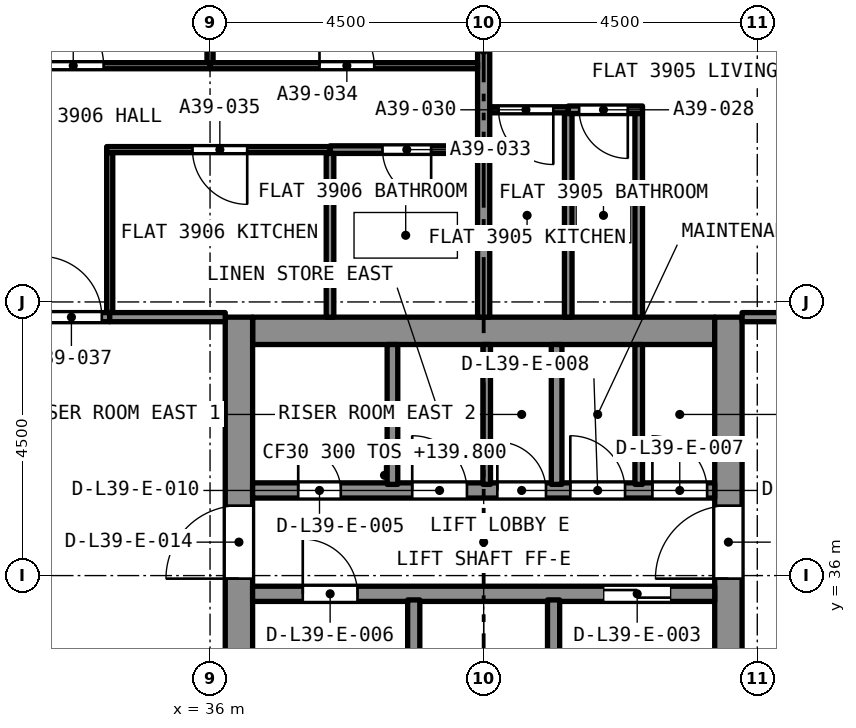
"""IFC4 building model, lengths in metres.
Left out: names, types, materials, properties, quantities, classifications, styles, units other than length and angle.
Written with IfcOpenShell. Run it as: python <this file> out.ifc"""

import sys

from ifc_helpers import new_model, si_unit, direction, frame, frame_2d, origin, place, context, subcontext, project, spatial, rectangle, extrude, element, fill, save


model = new_model("IFC4")
c1 = context("Model", 3, precision=1e-05, world=origin(), true_north=direction((0.0, 1.0)))
c2 = subcontext(c1, "Body", "Model", "MODEL_VIEW")
j1 = project(units=[si_unit("LENGTHUNIT", "METRE"), si_unit("PLANEANGLEUNIT", "RADIAN")], contexts=[c1])
p1 = place(None, origin())
s1 = spatial("IfcSite", under=j1, at=p1, CompositionType="ELEMENT")
p2 = place(p1, origin())
s2 = spatial("IfcBuilding", under=s1, at=p2, CompositionType="ELEMENT")
p3 = place(p2, frame((0.0, 0.0, 139.8)))
s3 = spatial("IfcBuildingStorey", under=s2, at=p3, CompositionType="ELEMENT", Elevation=139.8)
p4 = place(p3, frame((36.7, 40.025, 0.0), z_axis=(0.0, 0.0, 1.0), x_axis=(1.0, 0.0, 0.0)))
e1 = element("IfcWall", 1, at=p4, inside=s3, PredefinedType="SOLIDWALL", context=c2, shape_type="SweptSolid", body=[
    extrude(rectangle(XDim=7.6, YDim=0.45, at=frame_2d((3.8, 0.0))), origin(), (0.0, 0.0, 1.0), 3.2),
])
p5 = place(p3, frame((36.475, 27.25, 0.0), z_axis=(0.0, 0.0, 1.0), x_axis=(0.0, 1.0, 0.0)))
e2 = element("IfcWall", 2, at=p5, inside=s3, PredefinedType="SOLIDWALL", context=c2, shape_type="SweptSolid", body=[
    extrude(rectangle(XDim=13.0, YDim=0.45, at=frame_2d((6.5, 0.0))), origin(), (0.0, 0.0, 1.0), 3.2),
])
p6 = place(p5, frame((8.7, 0.0, 0.0)))
e3 = element("IfcOpeningElement", 3, at=p6, cuts=e2, PredefinedType="OPENING", context=c2, shape_type="SweptSolid", body=[
    extrude(rectangle(XDim=1.2, YDim=2.1, at=frame_2d((0.6, 1.05))), frame((0.0, 0.235, 0.0), z_axis=(0.0, -1.0, 0.0), x_axis=(1.0, 0.0, 0.0)), (0.0, 0.0, 1.0), 0.47),
])
p7 = place(p3, frame((44.525, 27.25, 0.0), z_axis=(0.0, 0.0, 1.0), x_axis=(0.0, 1.0, 0.0)))
e4 = element("IfcWall", 4, at=p7, inside=s3, PredefinedType="SOLIDWALL", context=c2, shape_type="SweptSolid", body=[
    extrude(rectangle(XDim=13.0, YDim=0.45, at=frame_2d((6.5, 0.0))), origin(), (0.0, 0.0, 1.0), 3.2),
])
p8 = place(p7, frame((8.7, 0.0, 0.0)))
e5 = element("IfcOpeningElement", 5, at=p8, cuts=e4, PredefinedType="OPENING", context=c2, shape_type="SweptSolid", body=[
    extrude(rectangle(XDim=1.2, YDim=2.1, at=frame_2d((0.6, 1.05))), frame((0.0, 0.235, 0.0), z_axis=(0.0, -1.0, 0.0), x_axis=(1.0, 0.0, 0.0)), (0.0, 0.0, 1.0), 0.47),
])
p9 = place(p3, frame((43.113, 43.66, 0.0), z_axis=(0.0, 0.0, 1.0), x_axis=(-1.0, 0.0, 0.0)))
e6 = element("IfcWall", 6, at=p9, inside=s3, PredefinedType="PARTITIONING", context=c2, shape_type="SweptSolid", body=[
    extrude(rectangle(XDim=1.222, YDim=0.125, at=frame_2d((0.611, 0.0))), origin(), (0.0, 0.0, 1.0), 2.9),
])
p10 = place(p9, frame((0.242, 0.0, 0.0)))
e7 = element("IfcOpeningElement", 7, at=p10, cuts=e6, PredefinedType="OPENING", context=c2, shape_type="SweptSolid", body=[
    extrude(rectangle(XDim=0.8, YDim=2.1, at=frame_2d((0.4, 1.05))), frame((0.0, 0.073, 0.0), z_axis=(0.0, -1.0, 0.0), x_axis=(1.0, 0.0, 0.0)), (0.0, 0.0, 1.0), 0.145),
])
for number, where, z_axis, x_axis in (
    (8, (43.05, 40.25, 0.0), (0.0, 0.0, 1.0), (0.0, 1.0, 0.0)),
    (9, (41.891, 40.25, 0.0), (0.0, 0.0, 1.0), (0.0, 1.0, 0.0)),
):
    element("IfcWall", number, at=place(p3, frame(where, z_axis=z_axis, x_axis=x_axis)), inside=s3, PredefinedType="PARTITIONING", context=c2, shape_type="SweptSolid", body=[
        extrude(rectangle(XDim=3.347, YDim=0.125, at=frame_2d((1.674, 0.0))), origin(), (0.0, 0.0, 1.0), 2.9),
    ])
p11 = place(p3, frame((41.891, 43.66, 0.0), z_axis=(0.0, 0.0, 1.0), x_axis=(-1.0, 0.0, 0.0)))
e10 = element("IfcWall", 10, at=p11, inside=s3, PredefinedType="PARTITIONING", context=c2, shape_type="SweptSolid", body=[
    extrude(rectangle(XDim=1.291, YDim=0.1, at=frame_2d((0.646, 0.0))), origin(), (0.0, 0.0, 1.0), 2.9),
])
p12 = place(p11, frame((0.246, 0.0, 0.0)))
e11 = element("IfcOpeningElement", 11, at=p12, cuts=e10, PredefinedType="OPENING", context=c2, shape_type="SweptSolid", body=[
    extrude(rectangle(XDim=0.9, YDim=2.1, at=frame_2d((0.45, 1.05))), frame((0.0, 0.06, 0.0), z_axis=(0.0, -1.0, 0.0), x_axis=(1.0, 0.0, 0.0)), (0.0, 0.0, 1.0), 0.12),
])
p13 = place(p3, frame((44.75, 40.25, 0.0), z_axis=(0.0, 0.0, 1.0), x_axis=(1.0, 0.0, 0.0)))
e12 = element("IfcWall", 12, at=p13, inside=s3, PredefinedType="PARTITIONING", context=c2, shape_type="SweptSolid", body=[
    extrude(rectangle(XDim=4.275, YDim=0.15, at=frame_2d((2.137, 0.0))), origin(), (0.0, 0.0, 1.0), 2.9),
])
p14 = place(p13, frame((2.0, 0.0, 0.0)))
e13 = element("IfcOpeningElement", 13, at=p14, cuts=e12, PredefinedType="OPENING", context=c2, shape_type="SweptSolid", body=[
    extrude(rectangle(XDim=1.0, YDim=2.1, at=frame_2d((0.5, 1.05))), frame((0.0, 0.085, 0.0), z_axis=(0.0, -1.0, 0.0), x_axis=(1.0, 0.0, 0.0)), (0.0, 0.0, 1.0), 0.17),
])
p15 = place(p3, frame((40.5, 40.25, 0.0), z_axis=(0.0, 0.0, 1.0), x_axis=(0.0, 1.0, 0.0)))
e14 = element("IfcWall", 14, at=p15, inside=s3, PredefinedType="PARTITIONING", context=c2, shape_type="SweptSolid", body=[
    extrude(rectangle(XDim=8.775, YDim=0.2, at=frame_2d((4.387, 0.0))), origin(), (0.0, 0.0, 1.0), 2.9),
])
p16 = place(p3, frame((40.4, 43.005, 0.0), z_axis=(0.0, 0.0, 1.0), x_axis=(-1.0, 0.0, 0.0)))
e15 = element("IfcWall", 15, at=p16, inside=s3, PredefinedType="PARTITIONING", context=c2, shape_type="SweptSolid", body=[
    extrude(rectangle(XDim=2.427, YDim=0.125, at=frame_2d((1.214, 0.0))), origin(), (0.0, 0.0, 1.0), 2.9),
])
p17 = place(p16, frame((0.764, 0.0, 0.0)))
e16 = element("IfcOpeningElement", 16, at=p17, cuts=e15, PredefinedType="OPENING", context=c2, shape_type="SweptSolid", body=[
    extrude(rectangle(XDim=0.8, YDim=2.1, at=frame_2d((0.4, 1.05))), frame((0.0, 0.073, 0.0), z_axis=(0.0, -1.0, 0.0), x_axis=(1.0, 0.0, 0.0)), (0.0, 0.0, 1.0), 0.145),
])
p18 = place(p3, frame((37.973, 40.25, 0.0), z_axis=(0.0, 0.0, 1.0), x_axis=(0.0, 1.0, 0.0)))
e17 = element("IfcWall", 17, at=p18, inside=s3, PredefinedType="PARTITIONING", context=c2, shape_type="SweptSolid", body=[
    extrude(rectangle(XDim=2.692, YDim=0.125, at=frame_2d((1.346, 0.0))), origin(), (0.0, 0.0, 1.0), 2.9),
])
p19 = place(p3, frame((36.0, 44.385, 0.0), z_axis=(0.0, 0.0, 1.0), x_axis=(1.0, 0.0, 0.0)))
e18 = element("IfcWall", 18, at=p19, inside=s3, PredefinedType="PARTITIONING", context=c2, shape_type="SweptSolid", body=[
    extrude(rectangle(XDim=4.4, YDim=0.1, at=frame_2d((2.2, 0.0))), origin(), (0.0, 0.0, 1.0), 2.9),
])
p20 = place(p19, frame((1.8, 0.0, 0.0)))
e19 = element("IfcOpeningElement", 19, at=p20, cuts=e18, PredefinedType="OPENING", context=c2, shape_type="SweptSolid", body=[
    extrude(rectangle(XDim=0.9, YDim=2.1, at=frame_2d((0.45, 1.05))), frame((0.0, 0.06, 0.0), z_axis=(0.0, -1.0, 0.0), x_axis=(1.0, 0.0, 0.0)), (0.0, 0.0, 1.0), 0.12),
])
p21 = place(p3, frame((36.0, 44.435, 0.0), z_axis=(0.0, 0.0, 1.0), x_axis=(0.0, 1.0, 0.0)))
e20 = element("IfcWall", 20, at=p21, inside=s3, PredefinedType="PARTITIONING", context=c2, shape_type="SweptSolid", body=[
    extrude(rectangle(XDim=4.59, YDim=0.1, at=frame_2d((2.295, 0.0))), origin(), (0.0, 0.0, 1.0), 2.9),
])
p22 = place(p3, frame((37.973, 43.005, 0.0), z_axis=(0.0, 0.0, 1.0), x_axis=(-1.0, 0.0, 0.0)))
e21 = element("IfcWall", 21, at=p22, inside=s3, PredefinedType="PARTITIONING", context=c2, shape_type="SweptSolid", body=[
    extrude(rectangle(XDim=3.673, YDim=0.1, at=frame_2d((1.836, 0.0))), origin(), (0.0, 0.0, 1.0), 2.9),
])
p23 = place(p22, frame((1.361, 0.0, 0.0)))
e22 = element("IfcOpeningElement", 22, at=p23, cuts=e21, PredefinedType="OPENING", context=c2, shape_type="SweptSolid", body=[
    extrude(rectangle(XDim=0.9, YDim=2.1, at=frame_2d((0.45, 1.05))), frame((0.0, 0.06, 0.0), z_axis=(0.0, -1.0, 0.0), x_axis=(1.0, 0.0, 0.0)), (0.0, 0.0, 1.0), 0.12),
])
p24 = place(p3, frame((34.35, 40.325, 0.0), z_axis=(0.0, 0.0, 1.0), x_axis=(0.0, 1.0, 0.0)))
e23 = element("IfcWall", 23, at=p24, inside=s3, PredefinedType="PARTITIONING", context=c2, shape_type="SweptSolid", body=[
    extrude(rectangle(XDim=2.63, YDim=0.1, at=frame_2d((1.315, 0.0))), origin(), (0.0, 0.0, 1.0), 2.9),
])
p25 = place(p3, frame((31.625, 44.385, 0.0), z_axis=(0.0, 0.0, 1.0), x_axis=(1.0, 0.0, 0.0)))
e24 = element("IfcWall", 24, at=p25, inside=s3, PredefinedType="PARTITIONING", context=c2, shape_type="SweptSolid", body=[
    extrude(rectangle(XDim=4.375, YDim=0.1, at=frame_2d((2.188, 0.0))), origin(), (0.0, 0.0, 1.0), 2.9),
])
p26 = place(p25, frame((1.625, 0.0, 0.0)))
e25 = element("IfcOpeningElement", 25, at=p26, cuts=e24, PredefinedType="OPENING", context=c2, shape_type="SweptSolid", body=[
    extrude(rectangle(XDim=1.0, YDim=2.1, at=frame_2d((0.5, 1.05))), frame((0.0, 0.06, 0.0), z_axis=(0.0, -1.0, 0.0), x_axis=(1.0, 0.0, 0.0)), (0.0, 0.0, 1.0), 0.12),
])
p27 = place(p3, frame((31.975, 40.25, 0.0), z_axis=(0.0, 0.0, 1.0), x_axis=(1.0, 0.0, 0.0)))
e26 = element("IfcWall", 26, at=p27, inside=s3, PredefinedType="PARTITIONING", context=c2, shape_type="SweptSolid", body=[
    extrude(rectangle(XDim=2.375, YDim=0.15, at=frame_2d((1.188, 0.0))), origin(), (0.0, 0.0, 1.0), 2.9),
])
p28 = place(p27, frame((1.245, 0.0, 0.0)))
e27 = element("IfcOpeningElement", 27, at=p28, cuts=e26, PredefinedType="OPENING", context=c2, shape_type="SweptSolid", body=[
    extrude(rectangle(XDim=1.0, YDim=2.1, at=frame_2d((0.5, 1.05))), frame((0.0, 0.085, 0.0), z_axis=(0.0, -1.0, 0.0), x_axis=(1.0, 0.0, 0.0)), (0.0, 0.0, 1.0), 0.17),
])
p29 = place(p3, frame((34.35, 40.25, 0.0), z_axis=(0.0, 0.0, 1.0), x_axis=(1.0, 0.0, 0.0)))
e28 = element("IfcWall", 28, at=p29, inside=s3, PredefinedType="PARTITIONING", context=c2, shape_type="SweptSolid", body=[
    extrude(rectangle(XDim=1.9, YDim=0.15, at=frame_2d((0.95, 0.0))), origin(), (0.0, 0.0, 1.0), 2.9),
])
p30 = place(p3, frame((36.7, 35.7, 0.0), z_axis=(0.0, 0.0, 1.0), x_axis=(1.0, 0.0, 0.0)))
e29 = element("IfcWall", 29, at=p30, inside=s3, PredefinedType="SOLIDWALL", context=c2, shape_type="SweptSolid", body=[
    extrude(rectangle(XDim=7.6, YDim=0.25, at=frame_2d((3.8, 0.0))), origin(), (0.0, 0.0, 1.0), 2.9),
])
p31 = place(p30, frame((5.775, 0.0, 0.0)))
e30 = element("IfcOpeningElement", 30, at=p31, cuts=e29, PredefinedType="OPENING", context=c2, shape_type="SweptSolid", body=[
    extrude(rectangle(XDim=1.1, YDim=2.4, at=frame_2d((0.55, 1.2))), frame((0.0, 0.135, 0.0), z_axis=(0.0, -1.0, 0.0), x_axis=(1.0, 0.0, 0.0)), (0.0, 0.0, 1.0), 0.27),
])
p32 = place(p30, frame((0.825, 0.0, 0.0)))
e31 = element("IfcOpeningElement", 31, at=p32, cuts=e29, PredefinedType="OPENING", context=c2, shape_type="SweptSolid", body=[
    extrude(rectangle(XDim=0.9, YDim=2.1, at=frame_2d((0.45, 1.05))), frame((0.0, 0.135, 0.0), z_axis=(0.0, -1.0, 0.0), x_axis=(1.0, 0.0, 0.0)), (0.0, 0.0, 1.0), 0.27),
])
p33 = place(p3, frame((36.7, 37.4, 0.0), z_axis=(0.0, 0.0, 1.0), x_axis=(1.0, 0.0, 0.0)))
e32 = element("IfcWall", 32, at=p33, inside=s3, PredefinedType="SOLIDWALL", context=c2, shape_type="SweptSolid", body=[
    extrude(rectangle(XDim=7.6, YDim=0.25, at=frame_2d((3.8, 0.0))), origin(), (0.0, 0.0, 1.0), 2.9),
])
p34 = place(p33, frame((0.75, 0.0, 0.0)))
e33 = element("IfcOpeningElement", 33, at=p34, cuts=e32, PredefinedType="OPENING", context=c2, shape_type="SweptSolid", body=[
    extrude(rectangle(XDim=0.7, YDim=2.1, at=frame_2d((0.35, 1.05))), frame((0.0, 0.135, 0.0), z_axis=(0.0, -1.0, 0.0), x_axis=(1.0, 0.0, 0.0)), (0.0, 0.0, 1.0), 0.27),
])
p35 = place(p33, frame((6.575, 0.0, 0.0)))
e34 = element("IfcOpeningElement", 34, at=p35, cuts=e32, PredefinedType="OPENING", context=c2, shape_type="SweptSolid", body=[
    extrude(rectangle(XDim=0.9, YDim=2.1, at=frame_2d((0.45, 1.05))), frame((0.0, 0.135, 0.0), z_axis=(0.0, -1.0, 0.0), x_axis=(1.0, 0.0, 0.0)), (0.0, 0.0, 1.0), 0.27),
])
p36 = place(p33, frame((5.225, 0.0, 0.0)))
e35 = element("IfcOpeningElement", 35, at=p36, cuts=e32, PredefinedType="OPENING", context=c2, shape_type="SweptSolid", body=[
    extrude(rectangle(XDim=0.9, YDim=2.1, at=frame_2d((0.45, 1.05))), frame((0.0, 0.135, 0.0), z_axis=(0.0, -1.0, 0.0), x_axis=(1.0, 0.0, 0.0)), (0.0, 0.0, 1.0), 0.27),
])
p37 = place(p33, frame((4.025, 0.0, 0.0)))
e36 = element("IfcOpeningElement", 36, at=p37, cuts=e32, PredefinedType="OPENING", context=c2, shape_type="SweptSolid", body=[
    extrude(rectangle(XDim=0.8, YDim=2.1, at=frame_2d((0.4, 1.05))), frame((0.0, 0.135, 0.0), z_axis=(0.0, -1.0, 0.0), x_axis=(1.0, 0.0, 0.0)), (0.0, 0.0, 1.0), 0.27),
])
p38 = place(p33, frame((2.625, 0.0, 0.0)))
e37 = element("IfcOpeningElement", 37, at=p38, cuts=e32, PredefinedType="OPENING", context=c2, shape_type="SweptSolid", body=[
    extrude(rectangle(XDim=0.9, YDim=2.1, at=frame_2d((0.45, 1.05))), frame((0.0, 0.135, 0.0), z_axis=(0.0, -1.0, 0.0), x_axis=(1.0, 0.0, 0.0)), (0.0, 0.0, 1.0), 0.27),
])
for number, where, z_axis, x_axis in (
    (38, (41.65, 33.3, 0.0), (0.0, 0.0, 1.0), (0.0, 1.0, 0.0)),
    (39, (39.35, 33.3, 0.0), (0.0, 0.0, 1.0), (0.0, 1.0, 0.0)),
):
    element("IfcWall", number, at=place(p3, frame(where, z_axis=z_axis, x_axis=x_axis)), inside=s3, PredefinedType="SOLIDWALL", context=c2, shape_type="SweptSolid", body=[
        extrude(rectangle(XDim=2.3, YDim=0.2, at=frame_2d((1.15, 0.0))), origin(), (0.0, 0.0, 1.0), 2.9),
    ])
for number, where, z_axis, x_axis in (
    (40, (41.7, 37.5, 0.0), (0.0, 0.0, 1.0), (0.0, 1.0, 0.0)),
    (41, (39.0, 37.5, 0.0), (0.0, 0.0, 1.0), (0.0, 1.0, 0.0)),
):
    element("IfcWall", number, at=place(p3, frame(where, z_axis=z_axis, x_axis=x_axis)), inside=s3, PredefinedType="SOLIDWALL", context=c2, shape_type="SweptSolid", body=[
        extrude(rectangle(XDim=2.3, YDim=0.175, at=frame_2d((1.15, 0.0))), origin(), (0.0, 0.0, 1.0), 2.9),
    ])
for number, where, z_axis, x_axis in (
    (42, (43.05, 37.5, 0.0), (0.0, 0.0, 1.0), (0.0, 1.0, 0.0)),
    (43, (40.55, 37.5, 0.0), (0.0, 0.0, 1.0), (0.0, 1.0, 0.0)),
):
    element("IfcWall", number, at=place(p3, frame(where, z_axis=z_axis, x_axis=x_axis)), inside=s3, PredefinedType="PARTITIONING", context=c2, shape_type="SweptSolid", body=[
        extrude(rectangle(XDim=2.3, YDim=0.125, at=frame_2d((1.15, 0.0))), origin(), (0.0, 0.0, 1.0), 2.9),
    ])
p39 = place(p10, origin())
e44 = element("IfcDoor", 44, at=p39, inside=s3, OperationType="SINGLE_SWING_RIGHT", PredefinedType="DOOR", context=c2, shape_type="SweptSolid", body=[
    extrude(rectangle(XDim=0.8, YDim=2.1, at=frame_2d((0.4, 1.05))), frame((0.0, 0.025, 0.0), z_axis=(0.0, -1.0, 0.0), x_axis=(1.0, 0.0, 0.0)), (0.0, 0.0, 1.0), 0.05),
])
fill(e7, e44)
p40 = place(p12, origin())
e45 = element("IfcDoor", 45, at=p40, inside=s3, OperationType="SINGLE_SWING_RIGHT", PredefinedType="DOOR", context=c2, shape_type="SweptSolid", body=[
    extrude(rectangle(XDim=0.9, YDim=2.1, at=frame_2d((0.45, 1.05))), frame((0.0, 0.025, 0.0), z_axis=(0.0, -1.0, 0.0), x_axis=(1.0, 0.0, 0.0)), (0.0, 0.0, 1.0), 0.05),
])
fill(e11, e45)
p41 = place(p17, origin())
e46 = element("IfcDoor", 46, at=p41, inside=s3, OperationType="SINGLE_SWING_LEFT", PredefinedType="DOOR", context=c2, shape_type="SweptSolid", body=[
    extrude(rectangle(XDim=0.8, YDim=2.1, at=frame_2d((0.4, 1.05))), frame((0.0, 0.025, 0.0), z_axis=(0.0, -1.0, 0.0), x_axis=(1.0, 0.0, 0.0)), (0.0, 0.0, 1.0), 0.05),
])
fill(e16, e46)
p42 = place(p20, origin())
e47 = element("IfcDoor", 47, at=p42, inside=s3, OperationType="SINGLE_SWING_RIGHT", PredefinedType="DOOR", context=c2, shape_type="SweptSolid", body=[
    extrude(rectangle(XDim=0.9, YDim=2.1, at=frame_2d((0.45, 1.05))), frame((0.0, 0.025, 0.0), z_axis=(0.0, -1.0, 0.0), x_axis=(1.0, 0.0, 0.0)), (0.0, 0.0, 1.0), 0.05),
])
fill(e19, e47)
p43 = place(p23, origin())
e48 = element("IfcDoor", 48, at=p43, inside=s3, OperationType="SINGLE_SWING_LEFT", PredefinedType="DOOR", context=c2, shape_type="SweptSolid", body=[
    extrude(rectangle(XDim=0.9, YDim=2.1, at=frame_2d((0.45, 1.05))), frame((0.0, 0.025, 0.0), z_axis=(0.0, -1.0, 0.0), x_axis=(1.0, 0.0, 0.0)), (0.0, 0.0, 1.0), 0.05),
])
fill(e22, e48)
p44 = place(p26, origin())
e49 = element("IfcDoor", 49, at=p44, inside=s3, OperationType="SINGLE_SWING_LEFT", PredefinedType="DOOR", context=c2, shape_type="SweptSolid", body=[
    extrude(rectangle(XDim=1.0, YDim=2.1, at=frame_2d((0.5, 1.05))), frame((0.0, 0.025, 0.0), z_axis=(0.0, -1.0, 0.0), x_axis=(1.0, 0.0, 0.0)), (0.0, 0.0, 1.0), 0.05),
])
fill(e25, e49)
p45 = place(p28, origin())
e50 = element("IfcDoor", 50, at=p45, inside=s3, OperationType="SINGLE_SWING_RIGHT", PredefinedType="DOOR", context=c2, shape_type="SweptSolid", body=[
    extrude(rectangle(XDim=1.0, YDim=2.1, at=frame_2d((0.5, 1.05))), frame((0.0, 0.025, 0.0), z_axis=(0.0, -1.0, 0.0), x_axis=(1.0, 0.0, 0.0)), (0.0, 0.0, 1.0), 0.05),
])
fill(e27, e50)
p46 = place(p31, origin())
e51 = element("IfcDoor", 51, at=p46, inside=s3, OperationType="SLIDING_TO_LEFT", PredefinedType="DOOR", context=c2, shape_type="SweptSolid", body=[
    extrude(rectangle(XDim=1.1, YDim=2.4, at=frame_2d((0.55, 1.2))), frame((0.0, 0.025, 0.0), z_axis=(0.0, -1.0, 0.0), x_axis=(1.0, 0.0, 0.0)), (0.0, 0.0, 1.0), 0.05),
])
fill(e30, e51)
p47 = place(p34, origin())
e52 = element("IfcDoor", 52, at=p47, inside=s3, OperationType="SINGLE_SWING_LEFT", PredefinedType="DOOR", context=c2, shape_type="SweptSolid", body=[
    extrude(rectangle(XDim=0.7, YDim=2.1, at=frame_2d((0.35, 1.05))), frame((0.0, 0.025, 0.0), z_axis=(0.0, -1.0, 0.0), x_axis=(1.0, 0.0, 0.0)), (0.0, 0.0, 1.0), 0.05),
])
fill(e33, e52)
p48 = place(p32, origin())
e53 = element("IfcDoor", 53, at=p48, inside=s3, OperationType="SINGLE_SWING_LEFT", PredefinedType="DOOR", context=c2, shape_type="SweptSolid", body=[
    extrude(rectangle(XDim=0.9, YDim=2.1, at=frame_2d((0.45, 1.05))), frame((0.0, 0.025, 0.0), z_axis=(0.0, -1.0, 0.0), x_axis=(1.0, 0.0, 0.0)), (0.0, 0.0, 1.0), 0.05),
])
fill(e31, e53)
p49 = place(p35, origin())
e54 = element("IfcDoor", 54, at=p49, inside=s3, OperationType="SINGLE_SWING_LEFT", PredefinedType="DOOR", context=c2, shape_type="SweptSolid", body=[
    extrude(rectangle(XDim=0.9, YDim=2.1, at=frame_2d((0.45, 1.05))), frame((0.0, 0.025, 0.0), z_axis=(0.0, -1.0, 0.0), x_axis=(1.0, 0.0, 0.0)), (0.0, 0.0, 1.0), 0.05),
])
fill(e34, e54)
p50 = place(p36, origin())
e55 = element("IfcDoor", 55, at=p50, inside=s3, OperationType="SINGLE_SWING_LEFT", PredefinedType="DOOR", context=c2, shape_type="SweptSolid", body=[
    extrude(rectangle(XDim=0.9, YDim=2.1, at=frame_2d((0.45, 1.05))), frame((0.0, 0.025, 0.0), z_axis=(0.0, -1.0, 0.0), x_axis=(1.0, 0.0, 0.0)), (0.0, 0.0, 1.0), 0.05),
])
fill(e35, e55)
p51 = place(p37, origin())
e56 = element("IfcDoor", 56, at=p51, inside=s3, OperationType="SINGLE_SWING_LEFT", PredefinedType="DOOR", context=c2, shape_type="SweptSolid", body=[
    extrude(rectangle(XDim=0.8, YDim=2.1, at=frame_2d((0.4, 1.05))), frame((0.0, 0.025, 0.0), z_axis=(0.0, -1.0, 0.0), x_axis=(1.0, 0.0, 0.0)), (0.0, 0.0, 1.0), 0.05),
])
fill(e36, e56)
p52 = place(p38, origin())
e57 = element("IfcDoor", 57, at=p52, inside=s3, OperationType="SINGLE_SWING_LEFT", PredefinedType="DOOR", context=c2, shape_type="SweptSolid", body=[
    extrude(rectangle(XDim=0.9, YDim=2.1, at=frame_2d((0.45, 1.05))), frame((0.0, 0.025, 0.0), z_axis=(0.0, -1.0, 0.0), x_axis=(1.0, 0.0, 0.0)), (0.0, 0.0, 1.0), 0.05),
])
fill(e37, e57)
p53 = place(p6, origin())
e58 = element("IfcDoor", 58, at=p53, inside=s3, OperationType="SINGLE_SWING_LEFT", PredefinedType="DOOR", context=c2, shape_type="SweptSolid", body=[
    extrude(rectangle(XDim=1.2, YDim=2.1, at=frame_2d((0.6, 1.05))), frame((0.0, 0.025, 0.0), z_axis=(0.0, -1.0, 0.0), x_axis=(1.0, 0.0, 0.0)), (0.0, 0.0, 1.0), 0.05),
])
fill(e3, e58)
p54 = place(p8, origin())
e59 = element("IfcDoor", 59, at=p54, inside=s3, OperationType="SINGLE_SWING_LEFT", PredefinedType="DOOR", context=c2, shape_type="SweptSolid", body=[
    extrude(rectangle(XDim=1.2, YDim=2.1, at=frame_2d((0.6, 1.05))), frame((0.0, 0.025, 0.0), z_axis=(0.0, -1.0, 0.0), x_axis=(1.0, 0.0, 0.0)), (0.0, 0.0, 1.0), 0.05),
])
fill(e5, e59)
save(model, sys.argv[1])
